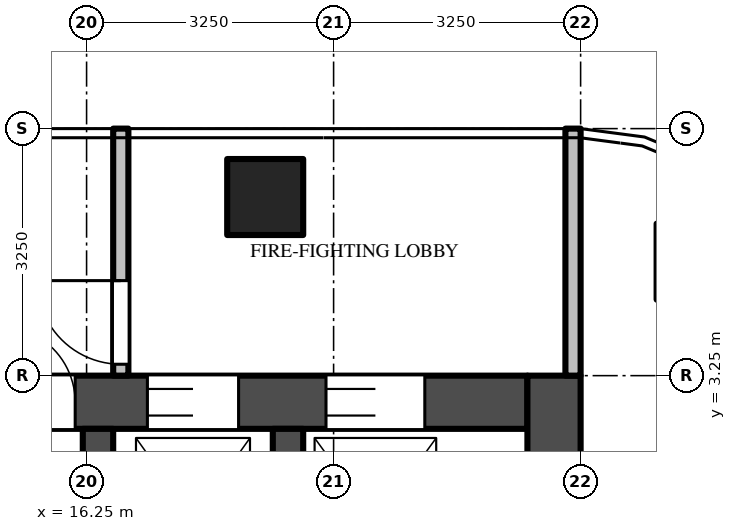
"""IFC4 building model, lengths in metres.
Left out: names, types, materials, properties, quantities, classifications, styles, units other than length and angle.
Written with IfcOpenShell. Run it as: python <this file> out.ifc"""

import sys

from ifc_helpers import new_model, si_unit, direction, frame, frame_2d, origin, origin_2d, place, context, subcontext, project, spatial, rectangle, extrude, source, transform, mapped, element, fill, save


model = new_model("IFC4")
c1 = context("Model", 3, precision=1e-05, world=origin(), true_north=direction((0.0, 1.0)))
c2 = subcontext(c1, "Body", "Model", "MODEL_VIEW")
j1 = project(units=[si_unit("LENGTHUNIT", "METRE"), si_unit("PLANEANGLEUNIT", "RADIAN")], contexts=[c1])
p1 = place(None, origin())
s1 = spatial("IfcSite", under=j1, at=p1, CompositionType="ELEMENT")
p2 = place(p1, origin())
s2 = spatial("IfcBuilding", under=s1, at=p2, CompositionType="ELEMENT")
p3 = place(p2, frame((0.0, 0.0, 271.4)))
s3 = spatial("IfcBuildingStorey", under=s2, at=p3, CompositionType="ELEMENT", Elevation=271.4)
m1 = source(origin(), c2, "Body", "SweptSolid", [
    extrude(rectangle(XDim=1.0, YDim=1.0, at=origin_2d()), origin(), (0.0, 0.0, 1.0), 8.0),
])
p4 = place(p3, frame((18.6, 5.6, 0.0), z_axis=(0.0, 0.0, 1.0), x_axis=(1.0, 0.0, 0.0)))
e1 = element("IfcColumn", 1, at=p4, inside=s3, PredefinedType="COLUMN", context=c2, shape_type="MappedRepresentation", body=[
    mapped(m1, transform((0.0, 0.0, 0.0))),
])
m2 = source(origin(), c2, "Body", "SweptSolid", [
    extrude(rectangle(XDim=14.85, YDim=0.7, at=frame_2d((7.425, 0.0))), origin(), (0.0, 0.0, 1.0), 7.8),
])
p5 = place(p3, frame((7.2, 2.9, 0.0), z_axis=(0.0, 0.0, 1.0), x_axis=(1.0, 0.0, 0.0)))
e2 = element("IfcWall", 2, at=p5, inside=s3, PredefinedType="SHEAR", context=c2, shape_type="MappedRepresentation", body=[
    mapped(m2, transform((0.0, 0.0, 0.0))),
])
m3 = source(origin(), c2, "Body", "SweptSolid", [
    extrude(rectangle(XDim=1.2, YDim=2.1, at=frame_2d((0.6, 1.05))), frame((0.0, 0.36, 0.0), z_axis=(0.0, -1.0, 0.0), x_axis=(1.0, 0.0, 0.0)), (0.0, 0.0, 1.0), 0.72),
])
p6 = place(p5, frame((5.7, 0.0, 0.0)))
e3 = element("IfcOpeningElement", 3, at=p6, cuts=e2, PredefinedType="OPENING", context=c2, shape_type="MappedRepresentation", body=[
    mapped(m3, transform((0.0, 0.0, 0.0))),
])
m4 = source(origin(), c2, "Body", "SweptSolid", [
    extrude(rectangle(XDim=1.3, YDim=2.1, at=frame_2d((0.65, 1.05))), frame((0.0, 0.36, 0.0), z_axis=(0.0, -1.0, 0.0), x_axis=(1.0, 0.0, 0.0)), (0.0, 0.0, 1.0), 0.72),
])
p7 = place(p5, frame((12.2, 0.0, 0.0)))
e4 = element("IfcOpeningElement", 4, at=p7, cuts=e2, PredefinedType="OPENING", context=c2, shape_type="MappedRepresentation", body=[
    mapped(m4, transform((0.0, 0.0, 0.0))),
])
p8 = place(p5, frame((9.85, 0.0, 0.0)))
e5 = element("IfcOpeningElement", 5, at=p8, cuts=e2, PredefinedType="OPENING", context=c2, shape_type="MappedRepresentation", body=[
    mapped(m3, transform((0.0, 0.0, 0.0))),
])
m5 = source(origin(), c2, "Body", "SweptSolid", [
    extrude(rectangle(XDim=1.0, YDim=2.1, at=frame_2d((0.5, 1.05))), frame((0.0, 0.36, 0.0), z_axis=(0.0, -1.0, 0.0), x_axis=(1.0, 0.0, 0.0)), (0.0, 0.0, 1.0), 0.72),
])
p9 = place(p5, frame((7.9, 0.0, 0.0)))
e6 = element("IfcOpeningElement", 6, at=p9, cuts=e2, PredefinedType="OPENING", context=c2, shape_type="MappedRepresentation", body=[
    mapped(m5, transform((0.0, 0.0, 0.0))),
])
m6 = source(origin(), c2, "Body", "SweptSolid", [
    extrude(rectangle(XDim=9.05, YDim=0.7, at=frame_2d((4.525, 0.0))), origin(), (0.0, 0.0, 1.0), 7.8),
])
p10 = place(p3, frame((22.4, -5.8, 0.0), z_axis=(0.0, 0.0, 1.0), x_axis=(0.0, 1.0, 0.0)))
e7 = element("IfcWall", 7, at=p10, inside=s3, PredefinedType="SHEAR", context=c2, shape_type="MappedRepresentation", body=[
    mapped(m6, transform((0.0, 0.0, 0.0))),
])
m7 = source(origin(), c2, "Body", "SweptSolid", [
    extrude(rectangle(XDim=2.45, YDim=0.4, at=frame_2d((1.225, 0.0))), origin(), (0.0, 0.0, 1.0), 7.8),
])
for number, where, z_axis, x_axis in (
    (8, (16.4, 0.1, 0.0), (0.0, 0.0, 1.0), (0.0, 1.0, 0.0)),
    (9, (18.9, 0.1, 0.0), (0.0, 0.0, 1.0), (0.0, 1.0, 0.0)),
):
    element("IfcWall", number, at=place(p3, frame(where, z_axis=z_axis, x_axis=x_axis)), inside=s3, PredefinedType="SHEAR", context=c2, shape_type="MappedRepresentation", body=[
        mapped(m7, transform((0.0, 0.0, 0.0))),
    ])
m8 = source(origin(), c2, "Body", "SweptSolid", [
    extrude(rectangle(XDim=3.25, YDim=0.2, at=frame_2d((1.625, 0.0))), origin(), (0.0, 0.0, 1.0), 7.8),
])
p11 = place(p3, frame((16.7, 3.25, 0.0), z_axis=(0.0, 0.0, 1.0), x_axis=(0.0, 1.0, 0.0)))
e10 = element("IfcWall", 10, at=p11, inside=s3, PredefinedType="PARTITIONING", context=c2, shape_type="MappedRepresentation", body=[
    mapped(m8, transform((0.0, 0.0, 0.0))),
])
m9 = source(origin(), c2, "Body", "SweptSolid", [
    extrude(rectangle(XDim=1.1, YDim=2.1, at=frame_2d((0.55, 1.05))), frame((0.0, 0.11, 0.0), z_axis=(0.0, -1.0, 0.0), x_axis=(1.0, 0.0, 0.0)), (0.0, 0.0, 1.0), 0.22),
])
p12 = place(p11, frame((0.15, 0.0, 0.0)))
e11 = element("IfcOpeningElement", 11, at=p12, cuts=e10, PredefinedType="OPENING", context=c2, shape_type="MappedRepresentation", body=[
    mapped(m9, transform((0.0, 0.0, 0.0))),
])
p13 = place(p3, frame((22.65, 3.25, 0.0), z_axis=(0.0, 0.0, 1.0), x_axis=(0.0, 1.0, 0.0)))
e12 = element("IfcWall", 12, at=p13, inside=s3, PredefinedType="PARTITIONING", context=c2, shape_type="MappedRepresentation", body=[
    mapped(m8, transform((0.0, 0.0, 0.0))),
])
m10 = source(origin(), c2, "Body", "SweptSolid", [
    extrude(rectangle(XDim=1.3, YDim=2.1, at=frame_2d((0.65, 1.05))), frame((0.0, -0.275, 0.0), z_axis=(0.0, -1.0, 0.0), x_axis=(1.0, 0.0, 0.0)), (0.0, 0.0, 1.0), 0.05),
])
p14 = place(p7, origin())
e13 = element("IfcDoor", 13, at=p14, inside=s3, OperationType="DOUBLE_DOOR_SLIDING", PredefinedType="DOOR", context=c2, shape_type="MappedRepresentation", body=[
    mapped(m10, transform((0.0, 0.0, 0.0))),
])
fill(e4, e13)
m11 = source(origin(), c2, "Body", "SweptSolid", [
    extrude(rectangle(XDim=1.2, YDim=2.1, at=frame_2d((0.6, 1.05))), frame((0.0, -0.275, 0.0), z_axis=(0.0, -1.0, 0.0), x_axis=(1.0, 0.0, 0.0)), (0.0, 0.0, 1.0), 0.05),
])
p15 = place(p8, origin())
e14 = element("IfcDoor", 14, at=p15, inside=s3, OperationType="DOUBLE_DOOR_SLIDING", PredefinedType="DOOR", context=c2, shape_type="MappedRepresentation", body=[
    mapped(m11, transform((0.0, 0.0, 0.0))),
])
fill(e5, e14)
m12 = source(origin(), c2, "Body", "SweptSolid", [
    extrude(rectangle(XDim=1.0, YDim=2.1, at=frame_2d((0.5, 1.05))), frame((0.0, -0.275, 0.0), z_axis=(0.0, -1.0, 0.0), x_axis=(1.0, 0.0, 0.0)), (0.0, 0.0, 1.0), 0.05),
])
p16 = place(p9, origin())
e15 = element("IfcDoor", 15, at=p16, inside=s3, OperationType="SINGLE_SWING_LEFT", PredefinedType="DOOR", context=c2, shape_type="MappedRepresentation", body=[
    mapped(m12, transform((0.0, 0.0, 0.0))),
])
fill(e6, e15)
m13 = source(origin(), c2, "Body", "SweptSolid", [
    extrude(rectangle(XDim=1.1, YDim=2.1, at=frame_2d((0.55, 1.05))), frame((0.0, 0.025, 0.0), z_axis=(0.0, -1.0, 0.0), x_axis=(1.0, 0.0, 0.0)), (0.0, 0.0, 1.0), 0.05),
])
p17 = place(p12, origin())
e16 = element("IfcDoor", 16, at=p17, inside=s3, OperationType="SINGLE_SWING_RIGHT", PredefinedType="DOOR", context=c2, shape_type="MappedRepresentation", body=[
    mapped(m13, transform((0.0, 0.0, 0.0))),
])
fill(e11, e16)
save(model, sys.argv[1])
